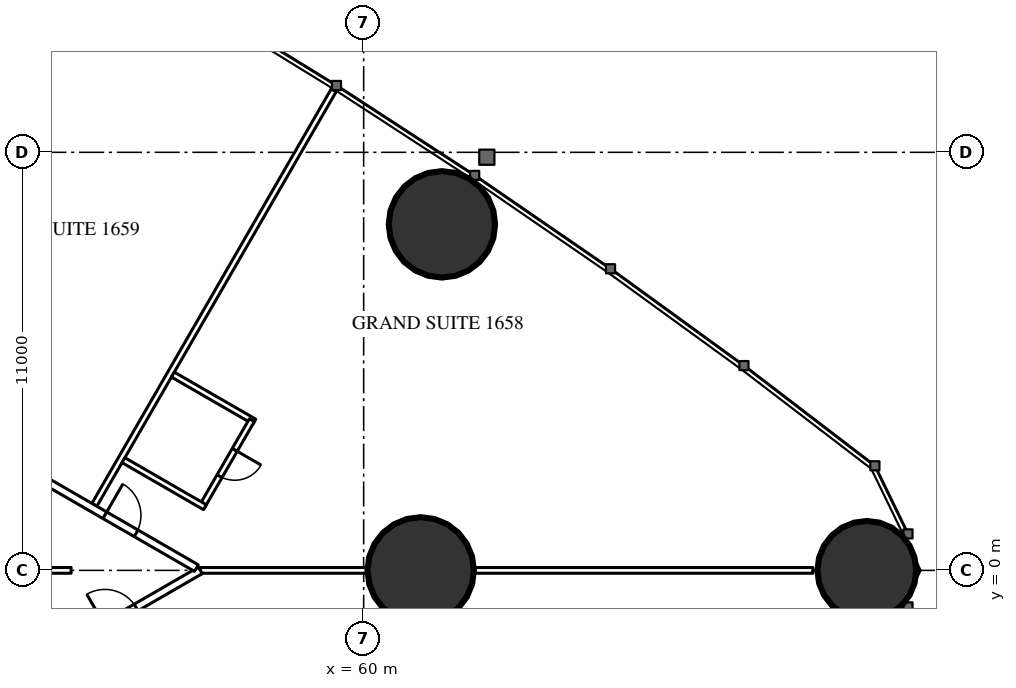
"""IFC4 building model, lengths in metres.
Left out: names, types, materials, properties, quantities, classifications, styles, units other than length and angle.
Written with IfcOpenShell. Run it as: python <this file> out.ifc"""

import sys

from ifc_helpers import new_model, si_unit, direction, frame, frame_2d, origin, origin_2d, place, context, subcontext, project, spatial, rectangle, hollow_circle, extrude, element, fill, save


model = new_model("IFC4")
c1 = context("Model", 3, precision=1e-05, world=origin(), true_north=direction((0.0, 1.0)))
c2 = subcontext(c1, "Body", "Model", "MODEL_VIEW")
j1 = project(units=[si_unit("LENGTHUNIT", "METRE"), si_unit("PLANEANGLEUNIT", "RADIAN")], contexts=[c1])
p1 = place(None, origin())
s1 = spatial("IfcSite", under=j1, at=p1, CompositionType="ELEMENT")
p2 = place(p1, origin())
s2 = spatial("IfcBuilding", under=s1, at=p2, CompositionType="ELEMENT")
p3 = place(p2, frame((0.0, 0.0, 63.5)))
s3 = spatial("IfcBuildingStorey", under=s2, at=p3, CompositionType="ELEMENT", Elevation=63.5)
p4 = place(p3, frame((73.239, 0.0, 0.0), z_axis=(0.0, 0.0, 1.0), x_axis=(1.0, 0.0, 0.0)))
e1 = element("IfcColumn", 1, at=p4, inside=s3, PredefinedType="COLUMN", context=c2, shape_type="SweptSolid", body=[
    extrude(hollow_circle(Radius=1.3, WallThickness=0.1, at=origin_2d()), origin(), (0.0, 0.0, 1.0), 3.5),
])
p5 = place(p3, frame((62.059, 9.105, 0.0), z_axis=(0.0, 0.0, 1.0), x_axis=(1.0, 0.0, 0.0)))
e2 = element("IfcColumn", 2, at=p5, inside=s3, PredefinedType="COLUMN", context=c2, shape_type="SweptSolid", body=[
    extrude(hollow_circle(Radius=1.4, WallThickness=0.12, at=origin_2d()), origin(), (0.0, 0.0, 1.0), 3.5),
])
p6 = place(p3, frame((61.5, 0.0, 0.0), z_axis=(0.0, 0.0, 1.0), x_axis=(1.0, 0.0, 0.0)))
e3 = element("IfcColumn", 3, at=p6, inside=s3, PredefinedType="COLUMN", context=c2, shape_type="SweptSolid", body=[
    extrude(hollow_circle(Radius=1.4, WallThickness=0.1, at=origin_2d()), origin(), (0.0, 0.0, 1.0), 3.5),
])
p7 = place(p3, frame((52.915, 1.725, 0.0), z_axis=(0.0, 0.0, 1.0), x_axis=(0.499997163113, 0.866027041656, 0.0)))
e4 = element("IfcWall", 4, at=p7, inside=s3, PredefinedType="PARTITIONING", context=c2, shape_type="SweptSolid", body=[
    extrude(rectangle(XDim=12.591, YDim=0.15, at=frame_2d((6.295, 0.0))), origin(), (0.0, 0.0, 1.0), 3.25),
])
p8 = place(p3, frame((55.702, 0.0, 0.0), z_axis=(0.0, 0.0, 1.0), x_axis=(1.0, 0.0, 0.0)))
e5 = element("IfcWall", 5, at=p8, inside=s3, PredefinedType="PARTITIONING", context=c2, shape_type="SweptSolid", body=[
    extrude(rectangle(XDim=16.117, YDim=0.15, at=frame_2d((8.059, 0.0))), origin(), (0.0, 0.0, 1.0), 2.25),
])
p9 = place(p3, frame((37.96, -10.243, 0.0), z_axis=(0.0, 0.0, 1.0), x_axis=(0.866026429433, 0.499998223521, 0.0)))
e6 = element("IfcWall", 6, at=p9, inside=s3, PredefinedType="PARTITIONING", context=c2, shape_type="SweptSolid", body=[
    extrude(rectangle(XDim=20.487, YDim=0.2, at=frame_2d((10.243, 0.0))), origin(), (0.0, 0.0, 1.0), 3.25),
])
p10 = place(p9, frame((6.925, 0.0, 0.0)))
e7 = element("IfcOpeningElement", 7, at=p10, cuts=e6, PredefinedType="OPENING", context=c2, shape_type="SweptSolid", body=[
    extrude(rectangle(XDim=0.95, YDim=2.2, at=frame_2d((0.475, 1.1))), frame((0.0, 0.11, 0.0), z_axis=(0.0, -1.0, 0.0), x_axis=(1.0, 0.0, 0.0)), (0.0, 0.0, 1.0), 0.22),
])
p11 = place(p9, frame((8.912, 0.0, 0.0)))
e8 = element("IfcOpeningElement", 8, at=p11, cuts=e6, PredefinedType="OPENING", context=c2, shape_type="SweptSolid", body=[
    extrude(rectangle(XDim=0.95, YDim=2.2, at=frame_2d((0.475, 1.1))), frame((0.0, 0.11, 0.0), z_axis=(0.0, -1.0, 0.0), x_axis=(1.0, 0.0, 0.0)), (0.0, 0.0, 1.0), 0.22),
])
p12 = place(p9, frame((13.535, 0.0, 0.0)))
e9 = element("IfcOpeningElement", 9, at=p12, cuts=e6, PredefinedType="OPENING", context=c2, shape_type="SweptSolid", body=[
    extrude(rectangle(XDim=0.95, YDim=2.2, at=frame_2d((0.475, 1.1))), frame((0.0, 0.11, 0.0), z_axis=(0.0, -1.0, 0.0), x_axis=(1.0, 0.0, 0.0)), (0.0, 0.0, 1.0), 0.22),
])
p13 = place(p9, frame((17.585, 0.0, 0.0)))
e10 = element("IfcOpeningElement", 10, at=p13, cuts=e6, PredefinedType="OPENING", context=c2, shape_type="SweptSolid", body=[
    extrude(rectangle(XDim=0.95, YDim=2.2, at=frame_2d((0.475, 1.1))), frame((0.0, 0.11, 0.0), z_axis=(0.0, -1.0, 0.0), x_axis=(1.0, 0.0, 0.0)), (0.0, 0.0, 1.0), 0.22),
])
p14 = place(p9, frame((2.875, 0.0, 0.0)))
e11 = element("IfcOpeningElement", 11, at=p14, cuts=e6, PredefinedType="OPENING", context=c2, shape_type="SweptSolid", body=[
    extrude(rectangle(XDim=0.95, YDim=2.2, at=frame_2d((0.475, 1.1))), frame((0.0, 0.11, 0.0), z_axis=(0.0, -1.0, 0.0), x_axis=(1.0, 0.0, 0.0)), (0.0, 0.0, 1.0), 0.22),
])
p15 = place(p3, frame((41.619, 8.131, 0.0), z_axis=(0.0, 0.0, 1.0), x_axis=(0.86603245327, -0.499987789734, 0.0)))
e12 = element("IfcWall", 12, at=p15, inside=s3, PredefinedType="PARTITIONING", context=c2, shape_type="SweptSolid", body=[
    extrude(rectangle(XDim=16.142, YDim=0.2, at=frame_2d((8.071, 0.0))), origin(), (0.0, 0.0, 1.0), 3.25),
])
p16 = place(p15, frame((13.36, 0.0, 0.0)))
e13 = element("IfcOpeningElement", 13, at=p16, cuts=e12, PredefinedType="OPENING", context=c2, shape_type="SweptSolid", body=[
    extrude(rectangle(XDim=0.95, YDim=2.2, at=frame_2d((0.475, 1.1))), frame((0.0, 0.11, 0.0), z_axis=(0.0, -1.0, 0.0), x_axis=(1.0, 0.0, 0.0)), (0.0, 0.0, 1.0), 0.22),
])
p17 = place(p15, frame((4.687, 0.0, 0.0)))
e14 = element("IfcOpeningElement", 14, at=p17, cuts=e12, PredefinedType="OPENING", context=c2, shape_type="SweptSolid", body=[
    extrude(rectangle(XDim=0.95, YDim=2.2, at=frame_2d((0.475, 1.1))), frame((0.0, 0.11, 0.0), z_axis=(0.0, -1.0, 0.0), x_axis=(1.0, 0.0, 0.0)), (0.0, 0.0, 1.0), 0.22),
])
p18 = place(p15, frame((2.987, 0.0, 0.0)))
e15 = element("IfcOpeningElement", 15, at=p18, cuts=e12, PredefinedType="OPENING", context=c2, shape_type="SweptSolid", body=[
    extrude(rectangle(XDim=0.95, YDim=2.2, at=frame_2d((0.475, 1.1))), frame((0.0, 0.11, 0.0), z_axis=(0.0, -1.0, 0.0), x_axis=(1.0, 0.0, 0.0)), (0.0, 0.0, 1.0), 0.22),
])
p19 = place(p3, frame((54.98, 5.151, 0.0), z_axis=(0.0, 0.0, 1.0), x_axis=(0.86604923931, -0.499958713387, 0.0)))
e16 = element("IfcWall", 16, at=p19, inside=s3, PredefinedType="PARTITIONING", context=c2, shape_type="SweptSolid", body=[
    extrude(rectangle(XDim=2.475, YDim=0.15, at=frame_2d((1.237, 0.0))), origin(), (0.0, 0.0, 1.0), 3.25),
])
p20 = place(p3, frame((55.758, 1.7, 0.0), z_axis=(0.0, 0.0, 1.0), x_axis=(0.500006934395, 0.866021400173, 0.0)))
e17 = element("IfcWall", 17, at=p20, inside=s3, PredefinedType="PARTITIONING", context=c2, shape_type="SweptSolid", body=[
    extrude(rectangle(XDim=2.6, YDim=0.15, at=frame_2d((1.3, 0.0))), origin(), (0.0, 0.0, 1.0), 3.25),
])
p21 = place(p20, frame((0.9, 0.0, 0.0)))
e18 = element("IfcOpeningElement", 18, at=p21, cuts=e17, PredefinedType="OPENING", context=c2, shape_type="SweptSolid", body=[
    extrude(rectangle(XDim=0.8, YDim=2.2, at=frame_2d((0.4, 1.1))), frame((0.0, 0.085, 0.0), z_axis=(0.0, -1.0, 0.0), x_axis=(1.0, 0.0, 0.0)), (0.0, 0.0, 1.0), 0.17),
])
p22 = place(p3, frame((53.68, 2.9, 0.0), z_axis=(0.0, 0.0, 1.0), x_axis=(0.866006523861, -0.500032699561, 0.0)))
e19 = element("IfcWall", 19, at=p22, inside=s3, PredefinedType="PARTITIONING", context=c2, shape_type="SweptSolid", body=[
    extrude(rectangle(XDim=2.475, YDim=0.15, at=frame_2d((1.237, 0.0))), origin(), (0.0, 0.0, 1.0), 3.25),
])
p23 = place(p3, frame((44.575, 0.0, 0.0), z_axis=(0.0, 0.0, 1.0), x_axis=(1.0, 0.0, 0.0)))
e20 = element("IfcWall", 20, at=p23, inside=s3, PredefinedType="PARTITIONING", context=c2, shape_type="SweptSolid", body=[
    extrude(rectangle(XDim=7.727, YDim=0.15, at=frame_2d((3.864, 0.0))), origin(), (0.0, 0.0, 1.0), 2.25),
])
p24 = place(p13, origin())
e21 = element("IfcDoor", 21, at=p24, inside=s3, OperationType="SINGLE_SWING_LEFT", PredefinedType="DOOR", context=c2, shape_type="SweptSolid", body=[
    extrude(rectangle(XDim=0.95, YDim=2.2, at=frame_2d((0.475, 1.1))), frame((0.0, 0.025, 0.0), z_axis=(0.0, -1.0, 0.0), x_axis=(1.0, 0.0, 0.0)), (0.0, 0.0, 1.0), 0.05),
])
fill(e10, e21)
p25 = place(p21, origin())
e22 = element("IfcDoor", 22, at=p25, inside=s3, OperationType="SINGLE_SWING_RIGHT", PredefinedType="DOOR", context=c2, shape_type="SweptSolid", body=[
    extrude(rectangle(XDim=0.8, YDim=2.2, at=frame_2d((0.4, 1.1))), frame((0.0, 0.025, 0.0), z_axis=(0.0, -1.0, 0.0), x_axis=(1.0, 0.0, 0.0)), (0.0, 0.0, 1.0), 0.05),
])
fill(e18, e22)
p26 = place(p16, origin())
e23 = element("IfcDoor", 23, at=p26, inside=s3, OperationType="SINGLE_SWING_LEFT", PredefinedType="DOOR", context=c2, shape_type="SweptSolid", body=[
    extrude(rectangle(XDim=0.95, YDim=2.2, at=frame_2d((0.475, 1.1))), frame((0.0, 0.025, 0.0), z_axis=(0.0, -1.0, 0.0), x_axis=(1.0, 0.0, 0.0)), (0.0, 0.0, 1.0), 0.05),
])
fill(e13, e23)
save(model, sys.argv[1])
